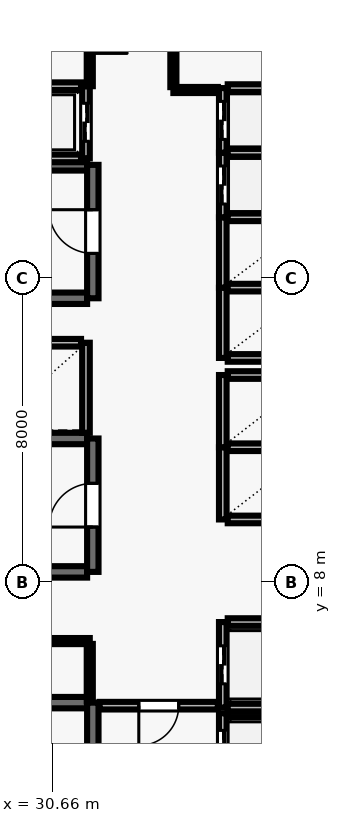
"""IFC4 building model, lengths in metres.
Left out: names, types, materials, properties, quantities, classifications, styles, units other than length and angle.
Written with IfcOpenShell. Run it as: python <this file> out.ifc"""

import sys

from ifc_helpers import new_model, si_unit, direction, frame, frame_2d, origin, place, context, subcontext, project, spatial, rectangle, extrude, element, fill, save


model = new_model("IFC4")
c1 = context("Model", 3, precision=1e-05, world=origin(), true_north=direction((0.0, 1.0)))
c2 = subcontext(c1, "Body", "Model", "MODEL_VIEW")
j1 = project(units=[si_unit("LENGTHUNIT", "METRE"), si_unit("PLANEANGLEUNIT", "RADIAN")], contexts=[c1])
p1 = place(None, origin())
s1 = spatial("IfcSite", under=j1, at=p1, CompositionType="ELEMENT")
p2 = place(p1, origin())
s2 = spatial("IfcBuilding", under=s1, at=p2, CompositionType="ELEMENT")
p3 = place(p2, frame((0.0, 0.0, 130.7)))
s3 = spatial("IfcBuildingStorey", under=s2, at=p3, CompositionType="ELEMENT", Elevation=130.7)
p4 = place(p3, frame((31.58, 4.83, 0.0), z_axis=(0.0, 0.0, 1.0), x_axis=(-1.0, 0.0, 0.0)))
e1 = element("IfcWall", 1, at=p4, inside=s3, PredefinedType="SHEAR", context=c2, shape_type="SweptSolid", body=[
    extrude(rectangle(XDim=8.36, YDim=0.3, at=frame_2d((4.18, 0.0))), origin(), (0.0, 0.0, 1.0), 3.69),
])
p5 = place(p3, frame((31.73, 0.96, 0.0), z_axis=(0.0, 0.0, 1.0), x_axis=(0.0, 1.0, 0.0)))
e2 = element("IfcWall", 2, at=p5, inside=s3, PredefinedType="SHEAR", context=c2, shape_type="SweptSolid", body=[
    extrude(rectangle(XDim=3.87, YDim=0.3, at=frame_2d((1.935, 0.0))), origin(), (0.0, 0.0, 1.0), 3.69),
])
p6 = place(p5, frame((1.54, 0.0, 0.0)))
e3 = element("IfcOpeningElement", 3, at=p6, cuts=e2, PredefinedType="OPENING", context=c2, shape_type="SweptSolid", body=[
    extrude(rectangle(XDim=1.15, YDim=2.15, at=frame_2d((0.575, 1.075))), frame((0.0, 0.16, 0.0), z_axis=(0.0, -1.0, 0.0), x_axis=(1.0, 0.0, 0.0)), (0.0, 0.0, 1.0), 0.32),
])
for number, where, z_axis, x_axis in (
    (4, (31.58, 18.98, 0.0), (0.0, 0.0, 1.0), (-1.0, 0.0, 0.0)),
    (5, (23.22, 15.47, 0.0), (0.0, 0.0, 1.0), (1.0, 0.0, 0.0)),
):
    element("IfcWall", number, at=place(p3, frame(where, z_axis=z_axis, x_axis=x_axis)), inside=s3, PredefinedType="SHEAR", context=c2, shape_type="SweptSolid", body=[
        extrude(rectangle(XDim=8.36, YDim=0.3, at=frame_2d((4.18, 0.0))), origin(), (0.0, 0.0, 1.0), 3.69),
    ])
p7 = place(p3, frame((31.73, 15.47, 0.0), z_axis=(0.0, 0.0, 1.0), x_axis=(0.0, 1.0, 0.0)))
e6 = element("IfcWall", 6, at=p7, inside=s3, PredefinedType="SHEAR", context=c2, shape_type="SweptSolid", body=[
    extrude(rectangle(XDim=3.51, YDim=0.3, at=frame_2d((1.755, 0.0))), origin(), (0.0, 0.0, 1.0), 3.69),
])
p8 = place(p7, frame((1.18, 0.0, 0.0)))
e7 = element("IfcOpeningElement", 7, at=p8, cuts=e6, PredefinedType="OPENING", context=c2, shape_type="SweptSolid", body=[
    extrude(rectangle(XDim=1.15, YDim=2.15, at=frame_2d((0.575, 1.075))), frame((0.0, 0.16, 0.0), z_axis=(0.0, -1.0, 0.0), x_axis=(1.0, 0.0, 0.0)), (0.0, 0.0, 1.0), 0.32),
])
for number, where, z_axis, x_axis in (
    (8, (31.58, 11.78, 0.0), (0.0, 0.0, 1.0), (-1.0, 0.0, 0.0)),
    (9, (23.22, 8.27, 0.0), (0.0, 0.0, 1.0), (1.0, 0.0, 0.0)),
):
    element("IfcWall", number, at=place(p3, frame(where, z_axis=z_axis, x_axis=x_axis)), inside=s3, PredefinedType="SHEAR", context=c2, shape_type="SweptSolid", body=[
        extrude(rectangle(XDim=8.36, YDim=0.3, at=frame_2d((4.18, 0.0))), origin(), (0.0, 0.0, 1.0), 3.69),
    ])
p9 = place(p3, frame((31.73, 8.27, 0.0), z_axis=(0.0, 0.0, 1.0), x_axis=(0.0, 1.0, 0.0)))
e10 = element("IfcWall", 10, at=p9, inside=s3, PredefinedType="SHEAR", context=c2, shape_type="SweptSolid", body=[
    extrude(rectangle(XDim=3.51, YDim=0.3, at=frame_2d((1.755, 0.0))), origin(), (0.0, 0.0, 1.0), 3.69),
])
p10 = place(p9, frame((1.18, 0.0, 0.0)))
e11 = element("IfcOpeningElement", 11, at=p10, cuts=e10, PredefinedType="OPENING", context=c2, shape_type="SweptSolid", body=[
    extrude(rectangle(XDim=1.15, YDim=2.15, at=frame_2d((0.575, 1.075))), frame((0.0, 0.16, 0.0), z_axis=(0.0, -1.0, 0.0), x_axis=(1.0, 0.0, 0.0)), (0.0, 0.0, 1.0), 0.32),
])
p11 = place(p3, frame((35.15, 4.55, 0.0), z_axis=(0.0, 0.0, 1.0), x_axis=(0.0, -1.0, 0.0)))
e12 = element("IfcWall", 12, at=p11, inside=s3, PredefinedType="SOLIDWALL", context=c2, shape_type="SweptSolid", body=[
    extrude(rectangle(XDim=2.1, YDim=0.2, at=frame_2d((1.05, 0.0))), origin(), (0.0, 0.0, 1.0), 3.69),
])
p12 = place(p11, frame((0.45, 0.0, 0.0)))
e13 = element("IfcOpeningElement", 13, at=p12, cuts=e12, PredefinedType="OPENING", context=c2, shape_type="SweptSolid", body=[
    extrude(rectangle(XDim=1.2, YDim=2.15, at=frame_2d((0.6, 1.075))), frame((0.0, 0.11, 0.0), z_axis=(0.0, -1.0, 0.0), x_axis=(1.0, 0.0, 0.0)), (0.0, 0.0, 1.0), 0.22),
])
p13 = place(p3, frame((37.42, 4.55, 0.0), z_axis=(0.0, 0.0, 1.0), x_axis=(-1.0, 0.0, 0.0)))
e14 = element("IfcWall", 14, at=p13, inside=s3, PredefinedType="SOLIDWALL", context=c2, shape_type="SweptSolid", body=[
    extrude(rectangle(XDim=2.14, YDim=0.2, at=frame_2d((1.07, 0.0))), origin(), (0.0, 0.0, 1.0), 3.69),
])
p14 = place(p3, frame((35.15, 6.95, 0.0), z_axis=(0.0, 0.0, 1.0), x_axis=(0.0, -1.0, 0.0)))
e15 = element("IfcWall", 15, at=p14, inside=s3, PredefinedType="SOLIDWALL", context=c2, shape_type="SweptSolid", body=[
    extrude(rectangle(XDim=2.25, YDim=0.2, at=frame_2d((1.125, 0.0))), origin(), (0.0, 0.0, 1.0), 3.69),
])
p15 = place(p14, frame((0.625, 0.0, 0.0)))
e16 = element("IfcOpeningElement", 16, at=p15, cuts=e15, PredefinedType="OPENING", context=c2, shape_type="SweptSolid", body=[
    extrude(rectangle(XDim=1.0, YDim=2.1, at=frame_2d((0.5, 1.05))), frame((0.0, 0.11, 0.0), z_axis=(0.0, -1.0, 0.0), x_axis=(1.0, 0.0, 0.0)), (0.0, 0.0, 1.0), 0.22),
])
for number, where, z_axis, x_axis in (
    (17, (35.28, 4.7, 0.0), (0.0, 0.0, 1.0), (1.0, 0.0, 0.0)),
    (18, (37.42, 6.95, 0.0), (0.0, 0.0, 1.0), (-1.0, 0.0, 0.0)),
):
    element("IfcWall", number, at=place(p3, frame(where, z_axis=z_axis, x_axis=x_axis)), inside=s3, PredefinedType="SOLIDWALL", context=c2, shape_type="SweptSolid", body=[
        extrude(rectangle(XDim=2.14, YDim=0.2, at=frame_2d((1.07, 0.0))), origin(), (0.0, 0.0, 1.0), 3.69),
    ])
p16 = place(p3, frame((35.15, 11.55, 0.0), z_axis=(0.0, 0.0, 1.0), x_axis=(0.0, -1.0, 0.0)))
e19 = element("IfcWall", 19, at=p16, inside=s3, PredefinedType="SOLIDWALL", context=c2, shape_type="SweptSolid", body=[
    extrude(rectangle(XDim=1.9, YDim=0.2, at=frame_2d((0.95, 0.0))), origin(), (0.0, 0.0, 1.0), 3.69),
])
for number, where, z_axis, x_axis in (
    (20, (35.28, 9.65, 0.0), (0.0, 0.0, 1.0), (1.0, 0.0, 0.0)),
    (21, (37.42, 11.55, 0.0), (0.0, 0.0, 1.0), (-1.0, 0.0, 0.0)),
):
    element("IfcWall", number, at=place(p3, frame(where, z_axis=z_axis, x_axis=x_axis)), inside=s3, PredefinedType="SOLIDWALL", context=c2, shape_type="SweptSolid", body=[
        extrude(rectangle(XDim=2.14, YDim=0.2, at=frame_2d((1.07, 0.0))), origin(), (0.0, 0.0, 1.0), 3.69),
    ])
p17 = place(p3, frame((35.15, 13.45, 0.0), z_axis=(0.0, 0.0, 1.0), x_axis=(0.0, -1.0, 0.0)))
e22 = element("IfcWall", 22, at=p17, inside=s3, PredefinedType="SOLIDWALL", context=c2, shape_type="SweptSolid", body=[
    extrude(rectangle(XDim=1.9, YDim=0.2, at=frame_2d((0.95, 0.0))), origin(), (0.0, 0.0, 1.0), 3.69),
])
p18 = place(p3, frame((37.42, 13.45, 0.0), z_axis=(0.0, 0.0, 1.0), x_axis=(-1.0, 0.0, 0.0)))
e23 = element("IfcWall", 23, at=p18, inside=s3, PredefinedType="SOLIDWALL", context=c2, shape_type="SweptSolid", body=[
    extrude(rectangle(XDim=2.14, YDim=0.2, at=frame_2d((1.07, 0.0))), origin(), (0.0, 0.0, 1.0), 3.69),
])
p19 = place(p3, frame((31.55, 11.93, 0.0), z_axis=(0.0, 0.0, 1.0), x_axis=(0.0, 1.0, 0.0)))
e24 = element("IfcWall", 24, at=p19, inside=s3, PredefinedType="SOLIDWALL", context=c2, shape_type="SweptSolid", body=[
    extrude(rectangle(XDim=2.37, YDim=0.2, at=frame_2d((1.185, 0.0))), origin(), (0.0, 0.0, 1.0), 3.69),
])
p20 = place(p3, frame((31.42, 14.3, 0.0), z_axis=(0.0, 0.0, 1.0), x_axis=(-1.0, 0.0, 0.0)))
e25 = element("IfcWall", 25, at=p20, inside=s3, PredefinedType="SOLIDWALL", context=c2, shape_type="SweptSolid", body=[
    extrude(rectangle(XDim=2.44, YDim=0.2, at=frame_2d((1.22, 0.0))), origin(), (0.0, 0.0, 1.0), 3.69),
])
p21 = place(p3, frame((35.15, 15.75, 0.0), z_axis=(0.0, 0.0, 1.0), x_axis=(0.0, -1.0, 0.0)))
e26 = element("IfcWall", 26, at=p21, inside=s3, PredefinedType="SOLIDWALL", context=c2, shape_type="SweptSolid", body=[
    extrude(rectangle(XDim=1.85, YDim=0.2, at=frame_2d((0.925, 0.0))), origin(), (0.0, 0.0, 1.0), 3.69),
])
for number, where, z_axis, x_axis in (
    (27, (35.28, 13.9, 0.0), (0.0, 0.0, 1.0), (1.0, 0.0, 0.0)),
    (28, (37.42, 15.75, 0.0), (0.0, 0.0, 1.0), (-1.0, 0.0, 0.0)),
):
    element("IfcWall", number, at=place(p3, frame(where, z_axis=z_axis, x_axis=x_axis)), inside=s3, PredefinedType="SOLIDWALL", context=c2, shape_type="SweptSolid", body=[
        extrude(rectangle(XDim=2.14, YDim=0.2, at=frame_2d((1.07, 0.0))), origin(), (0.0, 0.0, 1.0), 3.69),
    ])
p22 = place(p3, frame((35.15, 17.6, 0.0), z_axis=(0.0, 0.0, 1.0), x_axis=(0.0, -1.0, 0.0)))
e29 = element("IfcWall", 29, at=p22, inside=s3, PredefinedType="SOLIDWALL", context=c2, shape_type="SweptSolid", body=[
    extrude(rectangle(XDim=1.85, YDim=0.2, at=frame_2d((0.925, 0.0))), origin(), (0.0, 0.0, 1.0), 3.69),
])
p23 = place(p3, frame((37.42, 17.6, 0.0), z_axis=(0.0, 0.0, 1.0), x_axis=(-1.0, 0.0, 0.0)))
e30 = element("IfcWall", 30, at=p23, inside=s3, PredefinedType="SOLIDWALL", context=c2, shape_type="SweptSolid", body=[
    extrude(rectangle(XDim=2.14, YDim=0.2, at=frame_2d((1.07, 0.0))), origin(), (0.0, 0.0, 1.0), 3.69),
])
p24 = place(p3, frame((35.15, 19.3, 0.0), z_axis=(0.0, 0.0, 1.0), x_axis=(0.0, -1.0, 0.0)))
e31 = element("IfcWall", 31, at=p24, inside=s3, PredefinedType="SOLIDWALL", context=c2, shape_type="SweptSolid", body=[
    extrude(rectangle(XDim=1.7, YDim=0.2, at=frame_2d((0.85, 0.0))), origin(), (0.0, 0.0, 1.0), 3.69),
])
p25 = place(p24, frame((0.35, 0.0, 0.0)))
e32 = element("IfcOpeningElement", 32, at=p25, cuts=e31, PredefinedType="OPENING", context=c2, shape_type="SweptSolid", body=[
    extrude(rectangle(XDim=1.0, YDim=2.1, at=frame_2d((0.5, 1.05))), frame((0.0, 0.11, 0.0), z_axis=(0.0, -1.0, 0.0), x_axis=(1.0, 0.0, 0.0)), (0.0, 0.0, 1.0), 0.22),
])
p26 = place(p3, frame((37.42, 19.3, 0.0), z_axis=(0.0, 0.0, 1.0), x_axis=(-1.0, 0.0, 0.0)))
e33 = element("IfcWall", 33, at=p26, inside=s3, PredefinedType="SOLIDWALL", context=c2, shape_type="SweptSolid", body=[
    extrude(rectangle(XDim=2.14, YDim=0.2, at=frame_2d((1.07, 0.0))), origin(), (0.0, 0.0, 1.0), 3.69),
])
p27 = place(p3, frame((35.15, 21.0, 0.0), z_axis=(0.0, 0.0, 1.0), x_axis=(0.0, -1.0, 0.0)))
e34 = element("IfcWall", 34, at=p27, inside=s3, PredefinedType="SOLIDWALL", context=c2, shape_type="SweptSolid", body=[
    extrude(rectangle(XDim=1.7, YDim=0.2, at=frame_2d((0.85, 0.0))), origin(), (0.0, 0.0, 1.0), 3.69),
])
p28 = place(p27, frame((0.35, 0.0, 0.0)))
e35 = element("IfcOpeningElement", 35, at=p28, cuts=e34, PredefinedType="OPENING", context=c2, shape_type="SweptSolid", body=[
    extrude(rectangle(XDim=1.0, YDim=2.1, at=frame_2d((0.5, 1.05))), frame((0.0, 0.11, 0.0), z_axis=(0.0, -1.0, 0.0), x_axis=(1.0, 0.0, 0.0)), (0.0, 0.0, 1.0), 0.22),
])
p29 = place(p3, frame((37.42, 21.0, 0.0), z_axis=(0.0, 0.0, 1.0), x_axis=(-1.0, 0.0, 0.0)))
e36 = element("IfcWall", 36, at=p29, inside=s3, PredefinedType="SOLIDWALL", context=c2, shape_type="SweptSolid", body=[
    extrude(rectangle(XDim=2.14, YDim=0.2, at=frame_2d((1.07, 0.0))), origin(), (0.0, 0.0, 1.0), 3.69),
])
p30 = place(p3, frame((31.55, 19.15, 0.0), z_axis=(0.0, 0.0, 1.0), x_axis=(0.0, 1.0, 0.0)))
e37 = element("IfcWall", 37, at=p30, inside=s3, PredefinedType="SOLIDWALL", context=c2, shape_type="SweptSolid", body=[
    extrude(rectangle(XDim=1.9, YDim=0.2, at=frame_2d((0.95, 0.0))), origin(), (0.0, 0.0, 1.0), 3.69),
])
p31 = place(p30, frame((0.45, 0.0, 0.0)))
e38 = element("IfcOpeningElement", 38, at=p31, cuts=e37, PredefinedType="OPENING", context=c2, shape_type="SweptSolid", body=[
    extrude(rectangle(XDim=1.0, YDim=2.1, at=frame_2d((0.5, 1.05))), frame((0.0, 0.11, 0.0), z_axis=(0.0, -1.0, 0.0), x_axis=(1.0, 0.0, 0.0)), (0.0, 0.0, 1.0), 0.22),
])
for number, where, z_axis, x_axis in (
    (39, (28.98, 19.15, 0.0), (0.0, 0.0, 1.0), (1.0, 0.0, 0.0)),
    (40, (31.42, 21.05, 0.0), (0.0, 0.0, 1.0), (-1.0, 0.0, 0.0)),
):
    element("IfcWall", number, at=place(p3, frame(where, z_axis=z_axis, x_axis=x_axis)), inside=s3, PredefinedType="SOLIDWALL", context=c2, shape_type="SweptSolid", body=[
        extrude(rectangle(XDim=2.44, YDim=0.2, at=frame_2d((1.22, 0.0))), origin(), (0.0, 0.0, 1.0), 3.69),
    ])
p32 = place(p3, frame((28.55, 6.45, 0.0), z_axis=(0.0, 0.0, 1.0), x_axis=(1.0, 0.0, 0.0)))
e41 = element("IfcWall", 41, at=p32, inside=s3, PredefinedType="PARTITIONING", context=c2, shape_type="SweptSolid", body=[
    extrude(rectangle(XDim=3.1, YDim=0.16, at=frame_2d((1.55, 0.0))), origin(), (0.0, 0.0, 1.0), 3.69),
])
p33 = place(p32, frame((1.11, 0.0, 0.0)))
e42 = element("IfcOpeningElement", 42, at=p33, cuts=e41, PredefinedType="OPENING", context=c2, shape_type="SweptSolid", body=[
    extrude(rectangle(XDim=0.88, YDim=2.1, at=frame_2d((0.44, 1.05))), frame((0.0, 0.09, 0.0), z_axis=(0.0, -1.0, 0.0), x_axis=(1.0, 0.0, 0.0)), (0.0, 0.0, 1.0), 0.18),
])
p34 = place(p3, frame((35.02, 4.75, 0.0), z_axis=(0.0, 0.0, 1.0), x_axis=(-1.0, 0.0, 0.0)))
e43 = element("IfcWall", 43, at=p34, inside=s3, PredefinedType="SOLIDWALL", context=c2, shape_type="SweptSolid", body=[
    extrude(rectangle(XDim=3.11, YDim=0.2, at=frame_2d((1.555, 0.0))), origin(), (0.0, 0.0, 1.0), 3.69),
])
p35 = place(p34, frame((1.03, 0.0, 0.0)))
e44 = element("IfcOpeningElement", 44, at=p35, cuts=e43, PredefinedType="OPENING", context=c2, shape_type="SweptSolid", body=[
    extrude(rectangle(XDim=1.05, YDim=2.15, at=frame_2d((0.525, 1.075))), frame((0.0, 0.11, 0.0), z_axis=(0.0, -1.0, 0.0), x_axis=(1.0, 0.0, 0.0)), (0.0, 0.0, 1.0), 0.22),
])
p36 = place(p3, frame((35.02, 20.95, 0.0), z_axis=(0.0, 0.0, 1.0), x_axis=(-1.0, 0.0, 0.0)))
e45 = element("IfcWall", 45, at=p36, inside=s3, PredefinedType="PARTITIONING", context=c2, shape_type="SweptSolid", body=[
    extrude(rectangle(XDim=1.17, YDim=0.16, at=frame_2d((0.585, 0.0))), origin(), (0.0, 0.0, 1.0), 3.69),
])
p37 = place(p3, frame((31.65, 4.86, 0.0), z_axis=(0.0, 0.0, 1.0), x_axis=(0.0, 1.0, 0.0)))
e46 = element("IfcWall", 46, at=p37, inside=s3, PredefinedType="PARTITIONING", context=c2, shape_type="SweptSolid", body=[
    extrude(rectangle(XDim=1.515, YDim=0.16, at=frame_2d((0.757, 0.0))), origin(), (0.0, 0.0, 1.0), 3.69),
])
p38 = place(p3, frame((31.65, 23.775, 0.0), z_axis=(0.0, 0.0, 1.0), x_axis=(0.0, -1.0, 0.0)))
e47 = element("IfcWall", 47, at=p38, inside=s3, PredefinedType="PARTITIONING", context=c2, shape_type="SweptSolid", body=[
    extrude(rectangle(XDim=2.725, YDim=0.16, at=frame_2d((1.362, 0.0))), origin(), (0.0, 0.0, 1.0), 3.69),
])
p39 = place(p38, frame((0.862, 0.0, 0.0)))
e48 = element("IfcOpeningElement", 48, at=p39, cuts=e47, PredefinedType="OPENING", context=c2, shape_type="SweptSolid", body=[
    extrude(rectangle(XDim=1.0, YDim=2.1, at=frame_2d((0.5, 1.05))), frame((0.0, 0.09, 0.0), z_axis=(0.0, -1.0, 0.0), x_axis=(1.0, 0.0, 0.0)), (0.0, 0.0, 1.0), 0.18),
])
p40 = place(p3, frame((33.85, 21.025, 0.0), z_axis=(0.0, 0.0, 1.0), x_axis=(0.0, 1.0, 0.0)))
e49 = element("IfcWall", 49, at=p40, inside=s3, PredefinedType="PARTITIONING", context=c2, shape_type="SweptSolid", body=[
    extrude(rectangle(XDim=2.75, YDim=0.16, at=frame_2d((1.375, 0.0))), origin(), (0.0, 0.0, 1.0), 3.69),
])
p41 = place(p8, origin())
e50 = element("IfcDoor", 50, at=p41, inside=s3, OperationType="SINGLE_SWING_RIGHT", PredefinedType="DOOR", context=c2, shape_type="SweptSolid", body=[
    extrude(rectangle(XDim=1.15, YDim=2.15, at=frame_2d((0.575, 1.075))), frame((0.0, 0.025, 0.0), z_axis=(0.0, -1.0, 0.0), x_axis=(1.0, 0.0, 0.0)), (0.0, 0.0, 1.0), 0.05),
])
fill(e7, e50)
p42 = place(p10, origin())
e51 = element("IfcDoor", 51, at=p42, inside=s3, OperationType="SINGLE_SWING_LEFT", PredefinedType="DOOR", context=c2, shape_type="SweptSolid", body=[
    extrude(rectangle(XDim=1.15, YDim=2.15, at=frame_2d((0.575, 1.075))), frame((0.0, 0.025, 0.0), z_axis=(0.0, -1.0, 0.0), x_axis=(1.0, 0.0, 0.0)), (0.0, 0.0, 1.0), 0.05),
])
fill(e11, e51)
p43 = place(p12, origin())
e52 = element("IfcDoor", 52, at=p43, inside=s3, OperationType="DOUBLE_DOOR_SLIDING", PredefinedType="DOOR", context=c2, shape_type="SweptSolid", body=[
    extrude(rectangle(XDim=1.2, YDim=2.15, at=frame_2d((0.6, 1.075))), frame((0.0, 0.025, 0.0), z_axis=(0.0, -1.0, 0.0), x_axis=(1.0, 0.0, 0.0)), (0.0, 0.0, 1.0), 0.05),
])
fill(e13, e52)
p44 = place(p15, origin())
e53 = element("IfcDoor", 53, at=p44, inside=s3, OperationType="DOUBLE_DOOR_SLIDING", PredefinedType="DOOR", context=c2, shape_type="SweptSolid", body=[
    extrude(rectangle(XDim=1.0, YDim=2.1, at=frame_2d((0.5, 1.05))), frame((0.0, 0.025, 0.0), z_axis=(0.0, -1.0, 0.0), x_axis=(1.0, 0.0, 0.0)), (0.0, 0.0, 1.0), 0.05),
])
fill(e16, e53)
p45 = place(p25, origin())
e54 = element("IfcDoor", 54, at=p45, inside=s3, OperationType="DOUBLE_DOOR_SLIDING", PredefinedType="DOOR", context=c2, shape_type="SweptSolid", body=[
    extrude(rectangle(XDim=1.0, YDim=2.1, at=frame_2d((0.5, 1.05))), frame((0.0, 0.025, 0.0), z_axis=(0.0, -1.0, 0.0), x_axis=(1.0, 0.0, 0.0)), (0.0, 0.0, 1.0), 0.05),
])
fill(e32, e54)
p46 = place(p28, origin())
e55 = element("IfcDoor", 55, at=p46, inside=s3, OperationType="DOUBLE_DOOR_SLIDING", PredefinedType="DOOR", context=c2, shape_type="SweptSolid", body=[
    extrude(rectangle(XDim=1.0, YDim=2.1, at=frame_2d((0.5, 1.05))), frame((0.0, 0.025, 0.0), z_axis=(0.0, -1.0, 0.0), x_axis=(1.0, 0.0, 0.0)), (0.0, 0.0, 1.0), 0.05),
])
fill(e35, e55)
p47 = place(p31, origin())
e56 = element("IfcDoor", 56, at=p47, inside=s3, OperationType="DOUBLE_DOOR_SLIDING", PredefinedType="DOOR", context=c2, shape_type="SweptSolid", body=[
    extrude(rectangle(XDim=1.0, YDim=2.1, at=frame_2d((0.5, 1.05))), frame((0.0, 0.025, 0.0), z_axis=(0.0, -1.0, 0.0), x_axis=(1.0, 0.0, 0.0)), (0.0, 0.0, 1.0), 0.05),
])
fill(e38, e56)
p48 = place(p35, origin())
e57 = element("IfcDoor", 57, at=p48, inside=s3, OperationType="SINGLE_SWING_RIGHT", PredefinedType="DOOR", context=c2, shape_type="SweptSolid", body=[
    extrude(rectangle(XDim=1.05, YDim=2.15, at=frame_2d((0.525, 1.075))), frame((0.0, 0.025, 0.0), z_axis=(0.0, -1.0, 0.0), x_axis=(1.0, 0.0, 0.0)), (0.0, 0.0, 1.0), 0.05),
])
fill(e44, e57)
p49 = place(p39, origin())
e58 = element("IfcDoor", 58, at=p49, inside=s3, OperationType="SINGLE_SWING_RIGHT", PredefinedType="DOOR", context=c2, shape_type="SweptSolid", body=[
    extrude(rectangle(XDim=1.0, YDim=2.1, at=frame_2d((0.5, 1.05))), frame((0.0, 0.025, 0.0), z_axis=(0.0, -1.0, 0.0), x_axis=(1.0, 0.0, 0.0)), (0.0, 0.0, 1.0), 0.05),
])
fill(e48, e58)
save(model, sys.argv[1])
